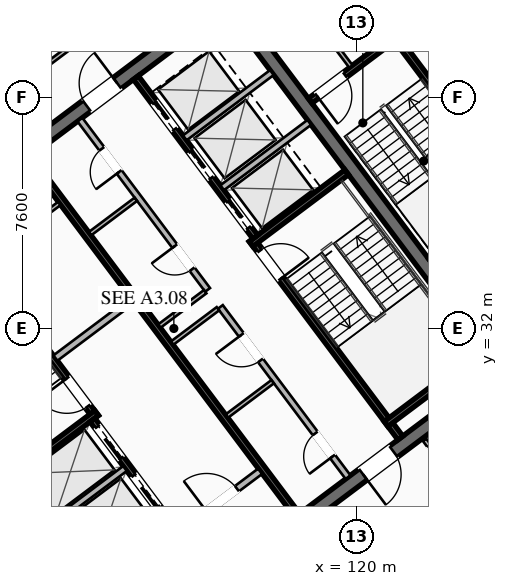
"""IFC4 building model, lengths in metres.
Left out: names, types, materials, properties, quantities, classifications, styles, units other than length and angle.
Written with IfcOpenShell. Run it as: python <this file> out.ifc"""

import sys

from ifc_helpers import new_model, si_unit, direction, frame, frame_2d, origin, place, context, subcontext, project, spatial, rectangle, extrude, element, fill, save


model = new_model("IFC4")
c1 = context("Model", 3, precision=1e-05, world=origin(), true_north=direction((0.0, 1.0)))
c2 = subcontext(c1, "Body", "Model", "MODEL_VIEW")
j1 = project(units=[si_unit("LENGTHUNIT", "METRE"), si_unit("PLANEANGLEUNIT", "RADIAN")], contexts=[c1])
p1 = place(None, origin())
s1 = spatial("IfcSite", under=j1, at=p1, CompositionType="ELEMENT")
p2 = place(p1, origin())
s2 = spatial("IfcBuilding", under=s1, at=p2, CompositionType="ELEMENT")
p3 = place(p2, frame((0.0, 0.0, 251.4)))
s3 = spatial("IfcBuildingStorey", under=s2, at=p3, CompositionType="ELEMENT", Elevation=251.4)
for number, where, z_axis, x_axis in (
    (1, (112.396, 21.047, 0.0), (0.0, 0.0, 1.0), (-0.6, 0.8, 0.0)),
    (2, (115.604, 42.953, 0.0), (0.0, 0.0, 1.0), (0.6, -0.8, 0.0)),
):
    element("IfcWall", number, at=place(p3, frame(where, z_axis=z_axis, x_axis=x_axis)), inside=s3, PredefinedType="SHEAR", context=c2, shape_type="SweptSolid", body=[
        extrude(rectangle(XDim=15.6, YDim=0.45, at=frame_2d((7.8, 0.0))), origin(), (0.0, 0.0, 1.0), 4.0),
    ])
p4 = place(p3, frame((124.649, 30.518, 0.0), z_axis=(0.0, 0.0, 1.0), x_axis=(-0.8, -0.6, 0.0)))
e3 = element("IfcWall", 3, at=p4, inside=s3, PredefinedType="SHEAR", context=c2, shape_type="SweptSolid", body=[
    extrude(rectangle(XDim=15.26, YDim=0.45, at=frame_2d((7.63, 0.0))), origin(), (0.0, 0.0, 1.0), 4.0),
])
p5 = place(p4, frame((9.33, 0.0, 0.0)))
e4 = element("IfcOpeningElement", 4, at=p5, cuts=e3, PredefinedType="OPENING", context=c2, shape_type="SweptSolid", body=[
    extrude(rectangle(XDim=1.25, YDim=2.25, at=frame_2d((0.625, 1.125))), frame((0.0, 0.235, 0.0), z_axis=(0.0, -1.0, 0.0), x_axis=(1.0, 0.0, 0.0)), (0.0, 0.0, 1.0), 0.47),
])
p6 = place(p4, frame((4.28, 0.0, 0.0)))
e5 = element("IfcOpeningElement", 5, at=p6, cuts=e3, PredefinedType="OPENING", context=c2, shape_type="SweptSolid", body=[
    extrude(rectangle(XDim=1.25, YDim=2.25, at=frame_2d((0.625, 1.125))), frame((0.0, 0.235, 0.0), z_axis=(0.0, -1.0, 0.0), x_axis=(1.0, 0.0, 0.0)), (0.0, 0.0, 1.0), 0.47),
])
p7 = place(p3, frame((103.351, 33.482, 0.0), z_axis=(0.0, 0.0, 1.0), x_axis=(0.8, 0.6, 0.0)))
e6 = element("IfcWall", 6, at=p7, inside=s3, PredefinedType="SHEAR", context=c2, shape_type="SweptSolid", body=[
    extrude(rectangle(XDim=15.26, YDim=0.45, at=frame_2d((7.63, 0.0))), origin(), (0.0, 0.0, 1.0), 4.0),
])
p8 = place(p7, frame((4.68, 0.0, 0.0)))
e7 = element("IfcOpeningElement", 7, at=p8, cuts=e6, PredefinedType="OPENING", context=c2, shape_type="SweptSolid", body=[
    extrude(rectangle(XDim=1.25, YDim=2.25, at=frame_2d((0.625, 1.125))), frame((0.0, 0.235, 0.0), z_axis=(0.0, -1.0, 0.0), x_axis=(1.0, 0.0, 0.0)), (0.0, 0.0, 1.0), 0.47),
])
p9 = place(p7, frame((9.73, 0.0, 0.0)))
e8 = element("IfcOpeningElement", 8, at=p9, cuts=e6, PredefinedType="OPENING", context=c2, shape_type="SweptSolid", body=[
    extrude(rectangle(XDim=1.25, YDim=2.25, at=frame_2d((0.625, 1.125))), frame((0.0, 0.235, 0.0), z_axis=(0.0, -1.0, 0.0), x_axis=(1.0, 0.0, 0.0)), (0.0, 0.0, 1.0), 0.47),
])
p10 = place(p3, frame((111.44, 29.08, 0.0), z_axis=(0.0, 0.0, 1.0), x_axis=(-0.59999041401, 0.800007189403, 0.0)))
e9 = element("IfcWall", 9, at=p10, inside=s3, PredefinedType="SHEAR", context=c2, shape_type="SweptSolid", body=[
    extrude(rectangle(XDim=8.15, YDim=0.2, at=frame_2d((4.075, 0.0))), origin(), (0.0, 0.0, 1.0), 3.78),
])
p11 = place(p10, frame((0.45, 0.0, 0.0)))
e10 = element("IfcOpeningElement", 10, at=p11, cuts=e9, PredefinedType="OPENING", context=c2, shape_type="SweptSolid", body=[
    extrude(rectangle(XDim=1.15, YDim=2.2, at=frame_2d((0.575, 1.1))), frame((0.0, 0.11, 0.0), z_axis=(0.0, -1.0, 0.0), x_axis=(1.0, 0.0, 0.0)), (0.0, 0.0, 1.0), 0.22),
])
p12 = place(p3, frame((108.316, 26.862, 0.0), z_axis=(0.0, 0.0, 1.0), x_axis=(0.800014909178, 0.599980120581, 0.0)))
e11 = element("IfcWall", 11, at=p12, inside=s3, PredefinedType="SHEAR", context=c2, shape_type="SweptSolid", body=[
    extrude(rectangle(XDim=3.93, YDim=0.2, at=frame_2d((1.965, 0.0))), origin(), (0.0, 0.0, 1.0), 3.78),
])
p13 = place(p3, frame((116.56, 34.92, 0.0), z_axis=(0.0, 0.0, 1.0), x_axis=(0.59999041401, -0.800007189403, 0.0)))
e12 = element("IfcWall", 12, at=p13, inside=s3, PredefinedType="SHEAR", context=c2, shape_type="SweptSolid", body=[
    extrude(rectangle(XDim=8.15, YDim=0.2, at=frame_2d((4.075, 0.0))), origin(), (0.0, 0.0, 1.0), 3.78),
])
p14 = place(p13, frame((0.45, 0.0, 0.0)))
e13 = element("IfcOpeningElement", 13, at=p14, cuts=e12, PredefinedType="OPENING", context=c2, shape_type="SweptSolid", body=[
    extrude(rectangle(XDim=1.15, YDim=2.2, at=frame_2d((0.575, 1.1))), frame((0.0, 0.11, 0.0), z_axis=(0.0, -1.0, 0.0), x_axis=(1.0, 0.0, 0.0)), (0.0, 0.0, 1.0), 0.22),
])
for number, where, z_axis, x_axis in (
    (14, (116.54, 34.78, 0.0), (0.0, 0.0, 1.0), (0.8, 0.6, 0.0)),
    (15, (120.98, 28.86, 0.0), (0.0, 0.0, 1.0), (0.8, 0.6, 0.0)),
):
    element("IfcWall", number, at=place(p3, frame(where, z_axis=z_axis, x_axis=x_axis)), inside=s3, PredefinedType="SHEAR", context=c2, shape_type="SweptSolid", body=[
        extrude(rectangle(XDim=3.93, YDim=0.2, at=frame_2d((1.965, 0.0))), origin(), (0.0, 0.0, 1.0), 3.78),
    ])
p15 = place(p3, frame((118.058, 25.856, 0.0), z_axis=(0.0, 0.0, 1.0), x_axis=(-0.600002657301, 0.799998007018, 0.0)))
e16 = element("IfcWall", 16, at=p15, inside=s3, PredefinedType="SHEAR", context=c2, shape_type="SweptSolid", body=[
    extrude(rectangle(XDim=14.7, YDim=0.2, at=frame_2d((7.35, 0.0))), origin(), (0.0, 0.0, 1.0), 3.78),
])
p16 = place(p3, frame((110.104, 31.028, 0.0), z_axis=(0.0, 0.0, 1.0), x_axis=(0.800018601094, 0.59997519774, 0.0)))
e17 = element("IfcWall", 17, at=p16, inside=s3, PredefinedType="SOLIDWALL", context=c2, shape_type="SweptSolid", body=[
    extrude(rectangle(XDim=3.15, YDim=0.22, at=frame_2d((1.575, 0.0))), origin(), (0.0, 0.0, 1.0), 2.971),
])
p17 = place(p3, frame((114.316, 25.412, 0.0), z_axis=(0.0, 0.0, 1.0), x_axis=(0.800018601094, 0.59997519774, 0.0)))
e18 = element("IfcWall", 18, at=p17, inside=s3, PredefinedType="SOLIDWALL", context=c2, shape_type="SweptSolid", body=[
    extrude(rectangle(XDim=3.15, YDim=0.22, at=frame_2d((1.575, 0.0))), origin(), (0.0, 0.0, 1.0), 2.971),
])
p18 = place(p17, frame((0.95, 0.0, 0.0)))
e19 = element("IfcOpeningElement", 19, at=p18, cuts=e18, PredefinedType="OPENING", context=c2, shape_type="SweptSolid", body=[
    extrude(rectangle(XDim=1.25, YDim=2.25, at=frame_2d((0.625, 1.125))), frame((0.0, 0.12, 0.0), z_axis=(0.0, -1.0, 0.0), x_axis=(1.0, 0.0, 0.0)), (0.0, 0.0, 1.0), 0.24),
])
p19 = place(p3, frame((115.25, 23.75, 0.0), z_axis=(0.0, 0.0, 1.0), x_axis=(-0.599994036198, 0.800004472816, 0.0)))
e20 = element("IfcWall", 20, at=p19, inside=s3, PredefinedType="SHEAR", context=c2, shape_type="SweptSolid", body=[
    extrude(rectangle(XDim=6.55, YDim=0.2, at=frame_2d((3.275, 0.0))), origin(), (0.0, 0.0, 1.0), 3.78),
])
p20 = place(p19, frame((4.975, 0.0, 0.0)))
e21 = element("IfcOpeningElement", 21, at=p20, cuts=e20, PredefinedType="OPENING", context=c2, shape_type="SweptSolid", body=[
    extrude(rectangle(XDim=1.3, YDim=2.25, at=frame_2d((0.65, 1.125))), frame((0.0, 0.11, 0.0), z_axis=(0.0, -1.0, 0.0), x_axis=(1.0, 0.0, 0.0)), (0.0, 0.0, 1.0), 0.22),
])
p21 = place(p19, frame((2.975, 0.0, 0.0)))
e22 = element("IfcOpeningElement", 22, at=p21, cuts=e20, PredefinedType="OPENING", context=c2, shape_type="SweptSolid", body=[
    extrude(rectangle(XDim=1.3, YDim=2.25, at=frame_2d((0.65, 1.125))), frame((0.0, 0.11, 0.0), z_axis=(0.0, -1.0, 0.0), x_axis=(1.0, 0.0, 0.0)), (0.0, 0.0, 1.0), 0.22),
])
p22 = place(p19, frame((0.775, 0.0, 0.0)))
e23 = element("IfcOpeningElement", 23, at=p22, cuts=e20, PredefinedType="OPENING", context=c2, shape_type="SweptSolid", body=[
    extrude(rectangle(XDim=1.3, YDim=2.25, at=frame_2d((0.65, 1.125))), frame((0.0, 0.11, 0.0), z_axis=(0.0, -1.0, 0.0), x_axis=(1.0, 0.0, 0.0)), (0.0, 0.0, 1.0), 0.22),
])
p23 = place(p3, frame((109.528, 25.246, 0.0), z_axis=(0.0, 0.0, 1.0), x_axis=(0.800008183455, 0.599989088572, 0.0)))
e24 = element("IfcWall", 24, at=p23, inside=s3, PredefinedType="SOLIDWALL", context=c2, shape_type="SweptSolid", body=[
    extrude(rectangle(XDim=3.58, YDim=0.2, at=frame_2d((1.79, 0.0))), origin(), (0.0, 0.0, 1.0), 3.78),
])
p24 = place(p3, frame((112.75, 40.25, 0.0), z_axis=(0.0, 0.0, 1.0), x_axis=(0.599994036198, -0.800004472816, 0.0)))
e25 = element("IfcWall", 25, at=p24, inside=s3, PredefinedType="SHEAR", context=c2, shape_type="SweptSolid", body=[
    extrude(rectangle(XDim=6.55, YDim=0.2, at=frame_2d((3.275, 0.0))), origin(), (0.0, 0.0, 1.0), 3.78),
])
p25 = place(p24, frame((5.075, 0.0, 0.0)))
e26 = element("IfcOpeningElement", 26, at=p25, cuts=e25, PredefinedType="OPENING", context=c2, shape_type="SweptSolid", body=[
    extrude(rectangle(XDim=1.1, YDim=2.2, at=frame_2d((0.55, 1.1))), frame((0.0, 0.11, 0.0), z_axis=(0.0, -1.0, 0.0), x_axis=(1.0, 0.0, 0.0)), (0.0, 0.0, 1.0), 0.22),
])
p26 = place(p24, frame((3.025, 0.0, 0.0)))
e27 = element("IfcOpeningElement", 27, at=p26, cuts=e25, PredefinedType="OPENING", context=c2, shape_type="SweptSolid", body=[
    extrude(rectangle(XDim=1.1, YDim=2.2, at=frame_2d((0.55, 1.1))), frame((0.0, 0.11, 0.0), z_axis=(0.0, -1.0, 0.0), x_axis=(1.0, 0.0, 0.0)), (0.0, 0.0, 1.0), 0.22),
])
p27 = place(p24, frame((1.025, 0.0, 0.0)))
e28 = element("IfcOpeningElement", 28, at=p27, cuts=e25, PredefinedType="OPENING", context=c2, shape_type="SweptSolid", body=[
    extrude(rectangle(XDim=1.1, YDim=2.2, at=frame_2d((0.55, 1.1))), frame((0.0, 0.11, 0.0), z_axis=(0.0, -1.0, 0.0), x_axis=(1.0, 0.0, 0.0)), (0.0, 0.0, 1.0), 0.22),
])
for number, where, z_axis, x_axis in (
    (29, (115.59, 36.63, 0.0), (0.0, 0.0, 1.0), (0.8, 0.6, 0.0)),
    (30, (114.36, 38.27, 0.0), (0.0, 0.0, 1.0), (0.8, 0.6, 0.0)),
):
    element("IfcWall", number, at=place(p3, frame(where, z_axis=z_axis, x_axis=x_axis)), inside=s3, PredefinedType="SOLIDWALL", context=c2, shape_type="SweptSolid", body=[
        extrude(rectangle(XDim=3.58, YDim=0.2, at=frame_2d((1.79, 0.0))), origin(), (0.0, 0.0, 1.0), 3.78),
    ])
p28 = place(p3, frame((107.71, 34.22, 0.0), z_axis=(0.0, 0.0, 1.0), x_axis=(0.799981399002, 0.60002480053, 0.0)))
e31 = element("IfcWall", 31, at=p28, inside=s3, PredefinedType="PARTITIONING", context=c2, shape_type="SweptSolid", body=[
    extrude(rectangle(XDim=3.15, YDim=0.135, at=frame_2d((1.575, 0.0))), origin(), (0.0, 0.0, 1.0), 2.971),
])
p29 = place(p28, frame((1.05, 0.0, 0.0)))
e32 = element("IfcOpeningElement", 32, at=p29, cuts=e31, PredefinedType="OPENING", context=c2, shape_type="SweptSolid", body=[
    extrude(rectangle(XDim=1.05, YDim=2.2, at=frame_2d((0.525, 1.1))), frame((0.0, 0.077, 0.0), z_axis=(0.0, -1.0, 0.0), x_axis=(1.0, 0.0, 0.0)), (0.0, 0.0, 1.0), 0.155),
])
p30 = place(p3, frame((119.73, 27.11, 0.0), z_axis=(0.0, 0.0, 1.0), x_axis=(-0.600005580459, 0.799995814625, 0.0)))
e33 = element("IfcWall", 33, at=p30, inside=s3, PredefinedType="SOLIDWALL", context=c2, shape_type="SweptSolid", body=[
    extrude(rectangle(XDim=7.0, YDim=0.2, at=frame_2d((3.5, 0.0))), origin(), (0.0, 0.0, 1.0), 2.971),
])
p31 = place(p30, frame((0.85, 0.0, 0.0)))
e34 = element("IfcOpeningElement", 34, at=p31, cuts=e33, PredefinedType="OPENING", context=c2, shape_type="SweptSolid", body=[
    extrude(rectangle(XDim=0.95, YDim=2.05, at=frame_2d((0.475, 1.025))), frame((0.0, 0.11, 0.0), z_axis=(0.0, -1.0, 0.0), x_axis=(1.0, 0.0, 0.0)), (0.0, 0.0, 1.0), 0.22),
])
p32 = place(p30, frame((4.8, 0.0, 0.0)))
e35 = element("IfcOpeningElement", 35, at=p32, cuts=e33, PredefinedType="OPENING", context=c2, shape_type="SweptSolid", body=[
    extrude(rectangle(XDim=1.05, YDim=2.2, at=frame_2d((0.525, 1.1))), frame((0.0, 0.11, 0.0), z_axis=(0.0, -1.0, 0.0), x_axis=(1.0, 0.0, 0.0)), (0.0, 0.0, 1.0), 0.22),
])
for number, where, z_axis, x_axis in (
    (36, (113.946, 31.522, 0.0), (0.0, 0.0, 1.0), (0.8, 0.6, 0.0)),
    (37, (115.746, 29.122, 0.0), (0.0, 0.0, 1.0), (0.8, 0.6, 0.0)),
):
    element("IfcWall", number, at=place(p3, frame(where, z_axis=z_axis, x_axis=x_axis)), inside=s3, PredefinedType="PARTITIONING", context=c2, shape_type="SweptSolid", body=[
        extrude(rectangle(XDim=1.88, YDim=0.135, at=frame_2d((0.94, 0.0))), origin(), (0.0, 0.0, 1.0), 2.971),
    ])
p33 = place(p3, frame((115.11, 33.27, 0.0), z_axis=(0.0, 0.0, 1.0), x_axis=(-0.600011160345, 0.79999162962, 0.0)))
e38 = element("IfcWall", 38, at=p33, inside=s3, PredefinedType="SOLIDWALL", context=c2, shape_type="SweptSolid", body=[
    extrude(rectangle(XDim=7.0, YDim=0.2, at=frame_2d((3.5, 0.0))), origin(), (0.0, 0.0, 1.0), 2.971),
])
p34 = place(p33, frame((0.85, 0.0, 0.0)))
e39 = element("IfcOpeningElement", 39, at=p34, cuts=e38, PredefinedType="OPENING", context=c2, shape_type="SweptSolid", body=[
    extrude(rectangle(XDim=0.95, YDim=2.05, at=frame_2d((0.475, 1.025))), frame((0.0, 0.11, 0.0), z_axis=(0.0, -1.0, 0.0), x_axis=(1.0, 0.0, 0.0)), (0.0, 0.0, 1.0), 0.22),
])
p35 = place(p33, frame((4.85, 0.0, 0.0)))
e40 = element("IfcOpeningElement", 40, at=p35, cuts=e38, PredefinedType="OPENING", context=c2, shape_type="SweptSolid", body=[
    extrude(rectangle(XDim=0.95, YDim=2.05, at=frame_2d((0.475, 1.025))), frame((0.0, 0.11, 0.0), z_axis=(0.0, -1.0, 0.0), x_axis=(1.0, 0.0, 0.0)), (0.0, 0.0, 1.0), 0.22),
])
p36 = place(p3, frame((113.526, 32.082, 0.0), z_axis=(0.0, 0.0, 1.0), x_axis=(0.800046745961, 0.599937666993, 0.0)))
e41 = element("IfcWall", 41, at=p36, inside=s3, PredefinedType="PARTITIONING", context=c2, shape_type="SweptSolid", body=[
    extrude(rectangle(XDim=1.88, YDim=0.135, at=frame_2d((0.94, 0.0))), origin(), (0.0, 0.0, 1.0), 2.971),
])
p37 = place(p3, frame((111.246, 35.122, 0.0), z_axis=(0.0, 0.0, 1.0), x_axis=(0.8, 0.6, 0.0)))
e42 = element("IfcWall", 42, at=p37, inside=s3, PredefinedType="PARTITIONING", context=c2, shape_type="SweptSolid", body=[
    extrude(rectangle(XDim=1.88, YDim=0.135, at=frame_2d((0.94, 0.0))), origin(), (0.0, 0.0, 1.0), 2.971),
])
p38 = place(p3, frame((125.304, 36.228, 0.0), z_axis=(0.0, 0.0, 1.0), x_axis=(-0.59998851072, 0.800008616831, 0.0)))
e43 = element("IfcWall", 43, at=p38, inside=s3, PredefinedType="SHEAR", context=c2, shape_type="SweptSolid", body=[
    extrude(rectangle(XDim=6.8, YDim=0.2, at=frame_2d((3.4, 0.0))), origin(), (0.0, 0.0, 1.0), 3.78),
])
p39 = place(p3, frame((121.204, 41.528, 0.0), z_axis=(0.0, 0.0, 1.0), x_axis=(-0.800017232136, -0.599977023131, 0.0)))
e44 = element("IfcWall", 44, at=p39, inside=s3, PredefinedType="SHEAR", context=c2, shape_type="SweptSolid", body=[
    extrude(rectangle(XDim=3.4, YDim=0.2, at=frame_2d((1.7, 0.0))), origin(), (0.0, 0.0, 1.0), 3.78),
])
p40 = place(p39, frame((1.975, 0.0, 0.0)))
e45 = element("IfcOpeningElement", 45, at=p40, cuts=e44, PredefinedType="OPENING", context=c2, shape_type="SweptSolid", body=[
    extrude(rectangle(XDim=1.15, YDim=2.2, at=frame_2d((0.575, 1.1))), frame((0.0, 0.11, 0.0), z_axis=(0.0, -1.0, 0.0), x_axis=(1.0, 0.0, 0.0)), (0.0, 0.0, 1.0), 0.22),
])
p41 = place(p3, frame((119.824, 40.618, 0.0), z_axis=(0.0, 0.0, 1.0), x_axis=(-0.599982243973, 0.800013316712, 0.0)))
e46 = element("IfcWall", 46, at=p41, inside=s3, PredefinedType="PARTITIONING", context=c2, shape_type="SweptSolid", body=[
    extrude(rectangle(XDim=4.4, YDim=0.135, at=frame_2d((2.2, 0.0))), origin(), (0.0, 0.0, 1.0), 2.971),
])
p42 = place(p3, frame((99.746, 33.122, 0.0), z_axis=(0.0, 0.0, 1.0), x_axis=(0.800001242445, 0.599998343403, 0.0)))
e47 = element("IfcWall", 47, at=p42, inside=s3, PredefinedType="PARTITIONING", context=c2, shape_type="SweptSolid", body=[
    extrude(rectangle(XDim=23.58, YDim=0.135, at=frame_2d((11.79, 0.0))), origin(), (0.0, 0.0, 1.0), 2.971),
])
p43 = place(p42, frame((0.3, 0.0, 0.0)))
e48 = element("IfcOpeningElement", 48, at=p43, cuts=e47, PredefinedType="OPENING", context=c2, shape_type="SweptSolid", body=[
    extrude(rectangle(XDim=0.95, YDim=2.05, at=frame_2d((0.475, 1.025))), frame((0.0, 0.077, 0.0), z_axis=(0.0, -1.0, 0.0), x_axis=(1.0, 0.0, 0.0)), (0.0, 0.0, 1.0), 0.155),
])
p44 = place(p42, frame((22.33, 0.0, 0.0)))
e49 = element("IfcOpeningElement", 49, at=p44, cuts=e47, PredefinedType="OPENING", context=c2, shape_type="SweptSolid", body=[
    extrude(rectangle(XDim=0.95, YDim=2.05, at=frame_2d((0.475, 1.025))), frame((0.0, 0.077, 0.0), z_axis=(0.0, -1.0, 0.0), x_axis=(1.0, 0.0, 0.0)), (0.0, 0.0, 1.0), 0.155),
])
p45 = place(p3, frame((122.248, 28.336, 0.0), z_axis=(0.0, 0.0, 1.0), x_axis=(0.600040975122, -0.799969267018, 0.0)))
e50 = element("IfcWall", 50, at=p45, inside=s3, PredefinedType="PARTITIONING", context=c2, shape_type="SweptSolid", body=[
    extrude(rectangle(XDim=2.86, YDim=0.135, at=frame_2d((1.43, 0.0))), origin(), (0.0, 0.0, 1.0), 2.971),
])
p46 = place(p45, frame((0.25, 0.0, 0.0)))
e51 = element("IfcOpeningElement", 51, at=p46, cuts=e50, PredefinedType="OPENING", context=c2, shape_type="SweptSolid", body=[
    extrude(rectangle(XDim=0.95, YDim=2.05, at=frame_2d((0.475, 1.025))), frame((0.0, 0.077, 0.0), z_axis=(0.0, -1.0, 0.0), x_axis=(1.0, 0.0, 0.0)), (0.0, 0.0, 1.0), 0.155),
])
p47 = place(p3, frame((111.86, 16.97, 0.0), z_axis=(0.0, 0.0, 1.0), x_axis=(-0.60000194242, 0.799998543181, 0.0)))
e52 = element("IfcWall", 52, at=p47, inside=s3, PredefinedType="PARTITIONING", context=c2, shape_type="SweptSolid", body=[
    extrude(rectangle(XDim=20.11, YDim=0.135, at=frame_2d((10.055, 0.0))), origin(), (0.0, 0.0, 1.0), 2.971),
])
p48 = place(p47, frame((0.3, 0.0, 0.0)))
e53 = element("IfcOpeningElement", 53, at=p48, cuts=e52, PredefinedType="OPENING", context=c2, shape_type="SweptSolid", body=[
    extrude(rectangle(XDim=0.95, YDim=2.05, at=frame_2d((0.475, 1.025))), frame((0.0, 0.077, 0.0), z_axis=(0.0, -1.0, 0.0), x_axis=(1.0, 0.0, 0.0)), (0.0, 0.0, 1.0), 0.155),
])
p49 = place(p9, origin())
e54 = element("IfcDoor", 54, at=p49, inside=s3, OperationType="SINGLE_SWING_RIGHT", PredefinedType="DOOR", context=c2, shape_type="SweptSolid", body=[
    extrude(rectangle(XDim=1.25, YDim=2.25, at=frame_2d((0.625, 1.125))), frame((0.0, 0.025, 0.0), z_axis=(0.0, -1.0, 0.0), x_axis=(1.0, 0.0, 0.0)), (0.0, 0.0, 1.0), 0.05),
])
fill(e8, e54)
p50 = place(p6, origin())
e55 = element("IfcDoor", 55, at=p50, inside=s3, OperationType="SINGLE_SWING_RIGHT", PredefinedType="DOOR", context=c2, shape_type="SweptSolid", body=[
    extrude(rectangle(XDim=1.25, YDim=2.25, at=frame_2d((0.625, 1.125))), frame((0.0, 0.025, 0.0), z_axis=(0.0, -1.0, 0.0), x_axis=(1.0, 0.0, 0.0)), (0.0, 0.0, 1.0), 0.05),
])
fill(e5, e55)
p51 = place(p11, origin())
e56 = element("IfcDoor", 56, at=p51, inside=s3, OperationType="SINGLE_SWING_RIGHT", PredefinedType="DOOR", context=c2, shape_type="SweptSolid", body=[
    extrude(rectangle(XDim=1.15, YDim=2.2, at=frame_2d((0.575, 1.1))), frame((0.0, 0.025, 0.0), z_axis=(0.0, -1.0, 0.0), x_axis=(1.0, 0.0, 0.0)), (0.0, 0.0, 1.0), 0.05),
])
fill(e10, e56)
p52 = place(p14, origin())
e57 = element("IfcDoor", 57, at=p52, inside=s3, OperationType="SINGLE_SWING_RIGHT", PredefinedType="DOOR", context=c2, shape_type="SweptSolid", body=[
    extrude(rectangle(XDim=1.15, YDim=2.2, at=frame_2d((0.575, 1.1))), frame((0.0, 0.025, 0.0), z_axis=(0.0, -1.0, 0.0), x_axis=(1.0, 0.0, 0.0)), (0.0, 0.0, 1.0), 0.05),
])
fill(e13, e57)
p53 = place(p18, origin())
e58 = element("IfcDoor", 58, at=p53, inside=s3, OperationType="SINGLE_SWING_LEFT", PredefinedType="DOOR", context=c2, shape_type="SweptSolid", body=[
    extrude(rectangle(XDim=1.25, YDim=2.25, at=frame_2d((0.625, 1.125))), frame((0.0, 0.025, 0.0), z_axis=(0.0, -1.0, 0.0), x_axis=(1.0, 0.0, 0.0)), (0.0, 0.0, 1.0), 0.05),
])
fill(e19, e58)
p54 = place(p31, origin())
e59 = element("IfcDoor", 59, at=p54, inside=s3, OperationType="SINGLE_SWING_LEFT", PredefinedType="DOOR", context=c2, shape_type="SweptSolid", body=[
    extrude(rectangle(XDim=0.95, YDim=2.05, at=frame_2d((0.475, 1.025))), frame((0.0, 0.025, 0.0), z_axis=(0.0, -1.0, 0.0), x_axis=(1.0, 0.0, 0.0)), (0.0, 0.0, 1.0), 0.05),
])
fill(e34, e59)
p55 = place(p32, origin())
e60 = element("IfcDoor", 60, at=p55, inside=s3, OperationType="SINGLE_SWING_RIGHT", PredefinedType="DOOR", context=c2, shape_type="SweptSolid", body=[
    extrude(rectangle(XDim=1.05, YDim=2.2, at=frame_2d((0.525, 1.1))), frame((0.0, 0.025, 0.0), z_axis=(0.0, -1.0, 0.0), x_axis=(1.0, 0.0, 0.0)), (0.0, 0.0, 1.0), 0.05),
])
fill(e35, e60)
p56 = place(p34, origin())
e61 = element("IfcDoor", 61, at=p56, inside=s3, OperationType="SINGLE_SWING_RIGHT", PredefinedType="DOOR", context=c2, shape_type="SweptSolid", body=[
    extrude(rectangle(XDim=0.95, YDim=2.05, at=frame_2d((0.475, 1.025))), frame((0.0, 0.025, 0.0), z_axis=(0.0, -1.0, 0.0), x_axis=(1.0, 0.0, 0.0)), (0.0, 0.0, 1.0), 0.05),
])
fill(e39, e61)
p57 = place(p35, origin())
e62 = element("IfcDoor", 62, at=p57, inside=s3, OperationType="SINGLE_SWING_LEFT", PredefinedType="DOOR", context=c2, shape_type="SweptSolid", body=[
    extrude(rectangle(XDim=0.95, YDim=2.05, at=frame_2d((0.475, 1.025))), frame((0.0, 0.025, 0.0), z_axis=(0.0, -1.0, 0.0), x_axis=(1.0, 0.0, 0.0)), (0.0, 0.0, 1.0), 0.05),
])
fill(e40, e62)
p58 = place(p40, origin())
e63 = element("IfcDoor", 63, at=p58, inside=s3, OperationType="SINGLE_SWING_RIGHT", PredefinedType="DOOR", context=c2, shape_type="SweptSolid", body=[
    extrude(rectangle(XDim=1.15, YDim=2.2, at=frame_2d((0.575, 1.1))), frame((0.0, 0.025, 0.0), z_axis=(0.0, -1.0, 0.0), x_axis=(1.0, 0.0, 0.0)), (0.0, 0.0, 1.0), 0.05),
])
fill(e45, e63)
p59 = place(p20, origin())
e64 = element("IfcDoor", 64, at=p59, inside=s3, OperationType="SLIDING_TO_LEFT", PredefinedType="DOOR", context=c2, shape_type="SweptSolid", body=[
    extrude(rectangle(XDim=1.3, YDim=2.25, at=frame_2d((0.65, 1.125))), frame((0.0, 0.025, 0.0), z_axis=(0.0, -1.0, 0.0), x_axis=(1.0, 0.0, 0.0)), (0.0, 0.0, 1.0), 0.05),
])
fill(e21, e64)
p60 = place(p21, origin())
e65 = element("IfcDoor", 65, at=p60, inside=s3, OperationType="SLIDING_TO_LEFT", PredefinedType="DOOR", context=c2, shape_type="SweptSolid", body=[
    extrude(rectangle(XDim=1.3, YDim=2.25, at=frame_2d((0.65, 1.125))), frame((0.0, 0.025, 0.0), z_axis=(0.0, -1.0, 0.0), x_axis=(1.0, 0.0, 0.0)), (0.0, 0.0, 1.0), 0.05),
])
fill(e22, e65)
p61 = place(p25, origin())
e66 = element("IfcDoor", 66, at=p61, inside=s3, OperationType="SLIDING_TO_LEFT", PredefinedType="DOOR", context=c2, shape_type="SweptSolid", body=[
    extrude(rectangle(XDim=1.1, YDim=2.2, at=frame_2d((0.55, 1.1))), frame((0.0, 0.025, 0.0), z_axis=(0.0, -1.0, 0.0), x_axis=(1.0, 0.0, 0.0)), (0.0, 0.0, 1.0), 0.05),
])
fill(e26, e66)
p62 = place(p26, origin())
e67 = element("IfcDoor", 67, at=p62, inside=s3, OperationType="SLIDING_TO_LEFT", PredefinedType="DOOR", context=c2, shape_type="SweptSolid", body=[
    extrude(rectangle(XDim=1.1, YDim=2.2, at=frame_2d((0.55, 1.1))), frame((0.0, 0.025, 0.0), z_axis=(0.0, -1.0, 0.0), x_axis=(1.0, 0.0, 0.0)), (0.0, 0.0, 1.0), 0.05),
])
fill(e27, e67)
p63 = place(p27, origin())
e68 = element("IfcDoor", 68, at=p63, inside=s3, OperationType="SLIDING_TO_LEFT", PredefinedType="DOOR", context=c2, shape_type="SweptSolid", body=[
    extrude(rectangle(XDim=1.1, YDim=2.2, at=frame_2d((0.55, 1.1))), frame((0.0, 0.025, 0.0), z_axis=(0.0, -1.0, 0.0), x_axis=(1.0, 0.0, 0.0)), (0.0, 0.0, 1.0), 0.05),
])
fill(e28, e68)
save(model, sys.argv[1])
